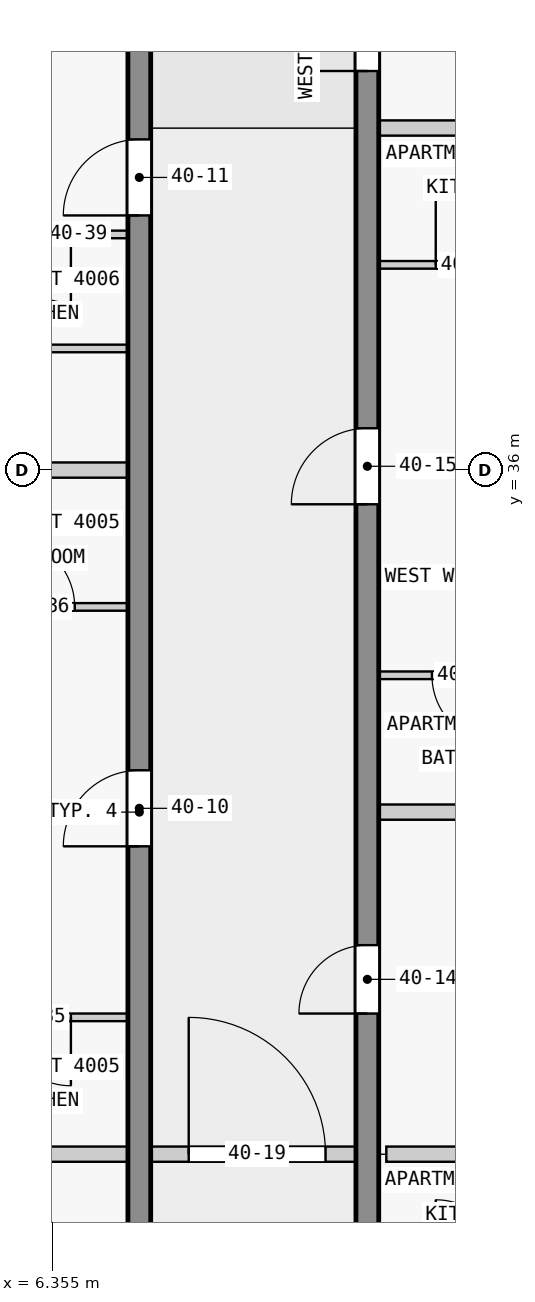
"""IFC4 building model, lengths in metres.
Left out: names, types, materials, properties, quantities, classifications, styles, units other than length and angle.
Written with IfcOpenShell. Run it as: python <this file> out.ifc"""

import sys

from ifc_helpers import new_model, si_unit, direction, frame, frame_2d, origin, place, context, subcontext, project, spatial, rectangle, extrude, element, fill, save


model = new_model("IFC4")
c1 = context("Model", 3, precision=1e-05, world=origin(), true_north=direction((0.0, 1.0)))
c2 = subcontext(c1, "Body", "Model", "MODEL_VIEW")
j1 = project(units=[si_unit("LENGTHUNIT", "METRE"), si_unit("PLANEANGLEUNIT", "RADIAN")], contexts=[c1])
p1 = place(None, origin())
s1 = spatial("IfcSite", under=j1, at=p1, CompositionType="ELEMENT")
p2 = place(p1, origin())
s2 = spatial("IfcBuilding", under=s1, at=p2, CompositionType="ELEMENT")
p3 = place(p2, frame((0.0, 0.0, 156.9)))
s3 = spatial("IfcBuildingStorey", under=s2, at=p3, CompositionType="ELEMENT", Elevation=156.9)
p4 = place(p3, frame((7.5, 18.0, 0.0), z_axis=(0.0, 0.0, 1.0), x_axis=(0.0, 1.0, 0.0)))
e1 = element("IfcWall", 1, at=p4, inside=s3, PredefinedType="SHEAR", context=c2, shape_type="SweptSolid", body=[
    extrude(rectangle(XDim=27.0, YDim=0.3, at=frame_2d((13.5, 0.0))), origin(), (0.0, 0.0, 1.0), 3.25),
])
p5 = place(p4, frame((1.75, 0.0, 0.0)))
e2 = element("IfcOpeningElement", 2, at=p5, cuts=e1, PredefinedType="OPENING", context=c2, shape_type="SweptSolid", body=[
    extrude(rectangle(XDim=1.0, YDim=2.1, at=frame_2d((0.5, 1.05))), frame((0.0, 0.16, 0.0), z_axis=(0.0, -1.0, 0.0), x_axis=(1.0, 0.0, 0.0)), (0.0, 0.0, 1.0), 0.32),
])
p6 = place(p4, frame((5.85, 0.0, 0.0)))
e3 = element("IfcOpeningElement", 3, at=p6, cuts=e1, PredefinedType="OPENING", context=c2, shape_type="SweptSolid", body=[
    extrude(rectangle(XDim=1.8, YDim=2.1, at=frame_2d((0.9, 1.05))), frame((0.0, 0.16, 0.0), z_axis=(0.0, -1.0, 0.0), x_axis=(1.0, 0.0, 0.0)), (0.0, 0.0, 1.0), 0.32),
])
p7 = place(p4, frame((13.05, 0.0, 0.0)))
e4 = element("IfcOpeningElement", 4, at=p7, cuts=e1, PredefinedType="OPENING", context=c2, shape_type="SweptSolid", body=[
    extrude(rectangle(XDim=1.0, YDim=2.1, at=frame_2d((0.5, 1.05))), frame((0.0, 0.16, 0.0), z_axis=(0.0, -1.0, 0.0), x_axis=(1.0, 0.0, 0.0)), (0.0, 0.0, 1.0), 0.32),
])
p8 = place(p4, frame((21.35, 0.0, 0.0)))
e5 = element("IfcOpeningElement", 5, at=p8, cuts=e1, PredefinedType="OPENING", context=c2, shape_type="SweptSolid", body=[
    extrude(rectangle(XDim=1.0, YDim=2.1, at=frame_2d((0.5, 1.05))), frame((0.0, 0.16, 0.0), z_axis=(0.0, -1.0, 0.0), x_axis=(1.0, 0.0, 0.0)), (0.0, 0.0, 1.0), 0.32),
])
p9 = place(p3, frame((10.5, 18.0, 0.0), z_axis=(0.0, 0.0, 1.0), x_axis=(0.0, 1.0, 0.0)))
e6 = element("IfcWall", 6, at=p9, inside=s3, PredefinedType="SHEAR", context=c2, shape_type="SweptSolid", body=[
    extrude(rectangle(XDim=27.0, YDim=0.3, at=frame_2d((13.5, 0.0))), origin(), (0.0, 0.0, 1.0), 3.25),
])
p10 = place(p9, frame((1.85, 0.0, 0.0)))
e7 = element("IfcOpeningElement", 7, at=p10, cuts=e6, PredefinedType="OPENING", context=c2, shape_type="SweptSolid", body=[
    extrude(rectangle(XDim=0.9, YDim=2.1, at=frame_2d((0.45, 1.05))), frame((0.0, 0.16, 0.0), z_axis=(0.0, -1.0, 0.0), x_axis=(1.0, 0.0, 0.0)), (0.0, 0.0, 1.0), 0.32),
])
p11 = place(p9, frame((6.25, 0.0, 0.0)))
e8 = element("IfcOpeningElement", 8, at=p11, cuts=e6, PredefinedType="OPENING", context=c2, shape_type="SweptSolid", body=[
    extrude(rectangle(XDim=1.0, YDim=2.1, at=frame_2d((0.5, 1.05))), frame((0.0, 0.16, 0.0), z_axis=(0.0, -1.0, 0.0), x_axis=(1.0, 0.0, 0.0)), (0.0, 0.0, 1.0), 0.32),
])
p12 = place(p9, frame((10.85, 0.0, 0.0)))
e9 = element("IfcOpeningElement", 9, at=p12, cuts=e6, PredefinedType="OPENING", context=c2, shape_type="SweptSolid", body=[
    extrude(rectangle(XDim=0.9, YDim=2.1, at=frame_2d((0.45, 1.05))), frame((0.0, 0.16, 0.0), z_axis=(0.0, -1.0, 0.0), x_axis=(1.0, 0.0, 0.0)), (0.0, 0.0, 1.0), 0.32),
])
p13 = place(p9, frame((17.55, 0.0, 0.0)))
e10 = element("IfcOpeningElement", 10, at=p13, cuts=e6, PredefinedType="OPENING", context=c2, shape_type="SweptSolid", body=[
    extrude(rectangle(XDim=1.0, YDim=2.1, at=frame_2d((0.5, 1.05))), frame((0.0, 0.16, 0.0), z_axis=(0.0, -1.0, 0.0), x_axis=(1.0, 0.0, 0.0)), (0.0, 0.0, 1.0), 0.32),
])
p14 = place(p9, frame((23.25, 0.0, 0.0)))
e11 = element("IfcOpeningElement", 11, at=p14, cuts=e6, PredefinedType="OPENING", context=c2, shape_type="SweptSolid", body=[
    extrude(rectangle(XDim=0.9, YDim=2.1, at=frame_2d((0.45, 1.05))), frame((0.0, 0.16, 0.0), z_axis=(0.0, -1.0, 0.0), x_axis=(1.0, 0.0, 0.0)), (0.0, 0.0, 1.0), 0.32),
])
p15 = place(p9, frame((25.45, 0.0, 0.0)))
e12 = element("IfcOpeningElement", 12, at=p15, cuts=e6, PredefinedType="OPENING", context=c2, shape_type="SweptSolid", body=[
    extrude(rectangle(XDim=1.0, YDim=2.1, at=frame_2d((0.5, 1.05))), frame((0.0, 0.16, 0.0), z_axis=(0.0, -1.0, 0.0), x_axis=(1.0, 0.0, 0.0)), (0.0, 0.0, 1.0), 0.32),
])
p16 = place(p3, frame((7.35, 27.0, 0.0), z_axis=(0.0, 0.0, 1.0), x_axis=(-1.0, 0.0, 0.0)))
e13 = element("IfcWall", 13, at=p16, inside=s3, PredefinedType="PARTITIONING", context=c2, shape_type="SweptSolid", body=[
    extrude(rectangle(XDim=7.43, YDim=0.2, at=frame_2d((3.715, 0.0))), origin(), (0.0, 0.0, 1.0), 3.25),
])
p17 = place(p3, frame((12.95, 27.0, 0.0), z_axis=(0.0, 0.0, 1.0), x_axis=(-1.0, 0.0, 0.0)))
e14 = element("IfcWall", 14, at=p17, inside=s3, PredefinedType="PARTITIONING", context=c2, shape_type="SweptSolid", body=[
    extrude(rectangle(XDim=2.2, YDim=0.2, at=frame_2d((1.1, 0.0))), origin(), (0.0, 0.0, 1.0), 3.25),
])
p18 = place(p3, frame((7.35, 28.8, 0.0), z_axis=(0.0, 0.0, 1.0), x_axis=(-1.0, 0.0, 0.0)))
e15 = element("IfcWall", 15, at=p18, inside=s3, PredefinedType="PARTITIONING", context=c2, shape_type="SweptSolid", body=[
    extrude(rectangle(XDim=2.4, YDim=0.1, at=frame_2d((1.2, 0.0))), origin(), (0.0, 0.0, 1.0), 3.25),
])
p19 = place(p18, frame((0.75, 0.0, 0.0)))
e16 = element("IfcOpeningElement", 16, at=p19, cuts=e15, PredefinedType="OPENING", context=c2, shape_type="SweptSolid", body=[
    extrude(rectangle(XDim=0.9, YDim=2.1, at=frame_2d((0.45, 1.05))), frame((0.0, 0.06, 0.0), z_axis=(0.0, -1.0, 0.0), x_axis=(1.0, 0.0, 0.0)), (0.0, 0.0, 1.0), 0.12),
])
p20 = place(p3, frame((17.85, 31.5, 0.0), z_axis=(0.0, 0.0, 1.0), x_axis=(-1.0, 0.0, 0.0)))
e17 = element("IfcWall", 17, at=p20, inside=s3, PredefinedType="PARTITIONING", context=c2, shape_type="SweptSolid", body=[
    extrude(rectangle(XDim=7.2, YDim=0.2, at=frame_2d((3.6, 0.0))), origin(), (0.0, 0.0, 1.0), 3.25),
])
p21 = place(p3, frame((13.0, 33.3, 0.0), z_axis=(0.0, 0.0, 1.0), x_axis=(-1.0, 0.0, 0.0)))
e18 = element("IfcWall", 18, at=p21, inside=s3, PredefinedType="PARTITIONING", context=c2, shape_type="SweptSolid", body=[
    extrude(rectangle(XDim=2.35, YDim=0.1, at=frame_2d((1.175, 0.0))), origin(), (0.0, 0.0, 1.0), 3.25),
])
p22 = place(p21, frame((0.75, 0.0, 0.0)))
e19 = element("IfcOpeningElement", 19, at=p22, cuts=e18, PredefinedType="OPENING", context=c2, shape_type="SweptSolid", body=[
    extrude(rectangle(XDim=0.9, YDim=2.1, at=frame_2d((0.45, 1.05))), frame((0.0, 0.06, 0.0), z_axis=(0.0, -1.0, 0.0), x_axis=(1.0, 0.0, 0.0)), (0.0, 0.0, 1.0), 0.12),
])
p23 = place(p3, frame((5.0, 34.2, 0.0), z_axis=(0.0, 0.0, 1.0), x_axis=(1.0, 0.0, 0.0)))
e20 = element("IfcWall", 20, at=p23, inside=s3, PredefinedType="PARTITIONING", context=c2, shape_type="SweptSolid", body=[
    extrude(rectangle(XDim=2.35, YDim=0.1, at=frame_2d((1.175, 0.0))), origin(), (0.0, 0.0, 1.0), 3.25),
])
p24 = place(p23, frame((0.75, 0.0, 0.0)))
e21 = element("IfcOpeningElement", 21, at=p24, cuts=e20, PredefinedType="OPENING", context=c2, shape_type="SweptSolid", body=[
    extrude(rectangle(XDim=0.9, YDim=2.1, at=frame_2d((0.45, 1.05))), frame((0.0, 0.06, 0.0), z_axis=(0.0, -1.0, 0.0), x_axis=(1.0, 0.0, 0.0)), (0.0, 0.0, 1.0), 0.12),
])
p25 = place(p3, frame((7.35, 36.0, 0.0), z_axis=(0.0, 0.0, 1.0), x_axis=(-1.0, 0.0, 0.0)))
e22 = element("IfcWall", 22, at=p25, inside=s3, PredefinedType="PARTITIONING", context=c2, shape_type="SweptSolid", body=[
    extrude(rectangle(XDim=5.95, YDim=0.2, at=frame_2d((2.975, 0.0))), origin(), (0.0, 0.0, 1.0), 3.25),
])
p26 = place(p3, frame((7.35, 37.6, 0.0), z_axis=(0.0, 0.0, 1.0), x_axis=(-1.0, 0.0, 0.0)))
e23 = element("IfcWall", 23, at=p26, inside=s3, PredefinedType="PARTITIONING", context=c2, shape_type="SweptSolid", body=[
    extrude(rectangle(XDim=2.35, YDim=0.1, at=frame_2d((1.175, 0.0))), origin(), (0.0, 0.0, 1.0), 3.25),
])
p27 = place(p3, frame((10.65, 38.7, 0.0), z_axis=(0.0, 0.0, 1.0), x_axis=(1.0, 0.0, 0.0)))
e24 = element("IfcWall", 24, at=p27, inside=s3, PredefinedType="PARTITIONING", context=c2, shape_type="SweptSolid", body=[
    extrude(rectangle(XDim=2.4, YDim=0.1, at=frame_2d((1.2, 0.0))), origin(), (0.0, 0.0, 1.0), 3.25),
])
p28 = place(p27, frame((0.75, 0.0, 0.0)))
e25 = element("IfcOpeningElement", 25, at=p28, cuts=e24, PredefinedType="OPENING", context=c2, shape_type="SweptSolid", body=[
    extrude(rectangle(XDim=0.9, YDim=2.1, at=frame_2d((0.45, 1.05))), frame((0.0, 0.06, 0.0), z_axis=(0.0, -1.0, 0.0), x_axis=(1.0, 0.0, 0.0)), (0.0, 0.0, 1.0), 0.12),
])
p29 = place(p3, frame((7.35, 39.1, 0.0), z_axis=(0.0, 0.0, 1.0), x_axis=(-1.0, 0.0, 0.0)))
e26 = element("IfcWall", 26, at=p29, inside=s3, PredefinedType="PARTITIONING", context=c2, shape_type="SweptSolid", body=[
    extrude(rectangle(XDim=2.35, YDim=0.1, at=frame_2d((1.175, 0.0))), origin(), (0.0, 0.0, 1.0), 3.25),
])
p30 = place(p29, frame((0.75, 0.0, 0.0)))
e27 = element("IfcOpeningElement", 27, at=p30, cuts=e26, PredefinedType="OPENING", context=c2, shape_type="SweptSolid", body=[
    extrude(rectangle(XDim=0.9, YDim=2.1, at=frame_2d((0.45, 1.05))), frame((0.0, 0.06, 0.0), z_axis=(0.0, -1.0, 0.0), x_axis=(1.0, 0.0, 0.0)), (0.0, 0.0, 1.0), 0.12),
])
p31 = place(p3, frame((12.95, 40.5, 0.0), z_axis=(0.0, 0.0, 1.0), x_axis=(-1.0, 0.0, 0.0)))
e28 = element("IfcWall", 28, at=p31, inside=s3, PredefinedType="PARTITIONING", context=c2, shape_type="SweptSolid", body=[
    extrude(rectangle(XDim=2.3, YDim=0.2, at=frame_2d((1.15, 0.0))), origin(), (0.0, 0.0, 1.0), 3.25),
])
p32 = place(p3, frame((7.45, 27.0, 0.0), z_axis=(0.0, 0.0, 1.0), x_axis=(1.0, 0.0, 0.0)))
e29 = element("IfcWall", 29, at=p32, inside=s3, PredefinedType="PARTITIONING", context=c2, shape_type="SweptSolid", body=[
    extrude(rectangle(XDim=3.2, YDim=0.2, at=frame_2d((1.6, 0.0))), origin(), (0.0, 0.0, 1.0), 3.25),
])
p33 = place(p32, frame((0.7, 0.0, 0.0)))
e30 = element("IfcOpeningElement", 30, at=p33, cuts=e29, PredefinedType="OPENING", context=c2, shape_type="SweptSolid", body=[
    extrude(rectangle(XDim=1.8, YDim=2.1, at=frame_2d((0.9, 1.05))), frame((0.0, 0.11, 0.0), z_axis=(0.0, -1.0, 0.0), x_axis=(1.0, 0.0, 0.0)), (0.0, 0.0, 1.0), 0.22),
])
p34 = place(p7, origin())
e31 = element("IfcDoor", 31, at=p34, inside=s3, OperationType="SINGLE_SWING_RIGHT", PredefinedType="DOOR", context=c2, shape_type="SweptSolid", body=[
    extrude(rectangle(XDim=1.0, YDim=2.1, at=frame_2d((0.5, 1.05))), frame((0.0, 0.025, 0.0), z_axis=(0.0, -1.0, 0.0), x_axis=(1.0, 0.0, 0.0)), (0.0, 0.0, 1.0), 0.05),
])
fill(e4, e31)
p35 = place(p8, origin())
e32 = element("IfcDoor", 32, at=p35, inside=s3, OperationType="SINGLE_SWING_RIGHT", PredefinedType="DOOR", context=c2, shape_type="SweptSolid", body=[
    extrude(rectangle(XDim=1.0, YDim=2.1, at=frame_2d((0.5, 1.05))), frame((0.0, 0.025, 0.0), z_axis=(0.0, -1.0, 0.0), x_axis=(1.0, 0.0, 0.0)), (0.0, 0.0, 1.0), 0.05),
])
fill(e5, e32)
p36 = place(p12, origin())
e33 = element("IfcDoor", 33, at=p36, inside=s3, OperationType="SINGLE_SWING_LEFT", PredefinedType="DOOR", context=c2, shape_type="SweptSolid", body=[
    extrude(rectangle(XDim=0.9, YDim=2.1, at=frame_2d((0.45, 1.05))), frame((0.0, 0.025, 0.0), z_axis=(0.0, -1.0, 0.0), x_axis=(1.0, 0.0, 0.0)), (0.0, 0.0, 1.0), 0.05),
])
fill(e9, e33)
p37 = place(p13, origin())
e34 = element("IfcDoor", 34, at=p37, inside=s3, OperationType="SINGLE_SWING_RIGHT", PredefinedType="DOOR", context=c2, shape_type="SweptSolid", body=[
    extrude(rectangle(XDim=1.0, YDim=2.1, at=frame_2d((0.5, 1.05))), frame((0.0, 0.025, 0.0), z_axis=(0.0, -1.0, 0.0), x_axis=(1.0, 0.0, 0.0)), (0.0, 0.0, 1.0), 0.05),
])
fill(e10, e34)
p38 = place(p14, origin())
e35 = element("IfcDoor", 35, at=p38, inside=s3, OperationType="SINGLE_SWING_RIGHT", PredefinedType="DOOR", context=c2, shape_type="SweptSolid", body=[
    extrude(rectangle(XDim=0.9, YDim=2.1, at=frame_2d((0.45, 1.05))), frame((0.0, 0.025, 0.0), z_axis=(0.0, -1.0, 0.0), x_axis=(1.0, 0.0, 0.0)), (0.0, 0.0, 1.0), 0.05),
])
fill(e11, e35)
p39 = place(p33, origin())
e36 = element("IfcDoor", 36, at=p39, inside=s3, OperationType="SINGLE_SWING_LEFT", PredefinedType="DOOR", context=c2, shape_type="SweptSolid", body=[
    extrude(rectangle(XDim=1.8, YDim=2.1, at=frame_2d((0.9, 1.05))), frame((0.0, 0.025, 0.0), z_axis=(0.0, -1.0, 0.0), x_axis=(1.0, 0.0, 0.0)), (0.0, 0.0, 1.0), 0.05),
])
fill(e30, e36)
p40 = place(p19, origin())
e37 = element("IfcDoor", 37, at=p40, inside=s3, OperationType="SINGLE_SWING_RIGHT", PredefinedType="DOOR", context=c2, shape_type="SweptSolid", body=[
    extrude(rectangle(XDim=0.9, YDim=2.1, at=frame_2d((0.45, 1.05))), frame((0.0, 0.025, 0.0), z_axis=(0.0, -1.0, 0.0), x_axis=(1.0, 0.0, 0.0)), (0.0, 0.0, 1.0), 0.05),
])
fill(e16, e37)
p41 = place(p24, origin())
e38 = element("IfcDoor", 38, at=p41, inside=s3, OperationType="SINGLE_SWING_RIGHT", PredefinedType="DOOR", context=c2, shape_type="SweptSolid", body=[
    extrude(rectangle(XDim=0.9, YDim=2.1, at=frame_2d((0.45, 1.05))), frame((0.0, 0.025, 0.0), z_axis=(0.0, -1.0, 0.0), x_axis=(1.0, 0.0, 0.0)), (0.0, 0.0, 1.0), 0.05),
])
fill(e21, e38)
p42 = place(p30, origin())
e39 = element("IfcDoor", 39, at=p42, inside=s3, OperationType="SINGLE_SWING_RIGHT", PredefinedType="DOOR", context=c2, shape_type="SweptSolid", body=[
    extrude(rectangle(XDim=0.9, YDim=2.1, at=frame_2d((0.45, 1.05))), frame((0.0, 0.025, 0.0), z_axis=(0.0, -1.0, 0.0), x_axis=(1.0, 0.0, 0.0)), (0.0, 0.0, 1.0), 0.05),
])
fill(e27, e39)
p43 = place(p22, origin())
e40 = element("IfcDoor", 40, at=p43, inside=s3, OperationType="SINGLE_SWING_RIGHT", PredefinedType="DOOR", context=c2, shape_type="SweptSolid", body=[
    extrude(rectangle(XDim=0.9, YDim=2.1, at=frame_2d((0.45, 1.05))), frame((0.0, 0.025, 0.0), z_axis=(0.0, -1.0, 0.0), x_axis=(1.0, 0.0, 0.0)), (0.0, 0.0, 1.0), 0.05),
])
fill(e19, e40)
p44 = place(p28, origin())
e41 = element("IfcDoor", 41, at=p44, inside=s3, OperationType="SINGLE_SWING_LEFT", PredefinedType="DOOR", context=c2, shape_type="SweptSolid", body=[
    extrude(rectangle(XDim=0.9, YDim=2.1, at=frame_2d((0.45, 1.05))), frame((0.0, 0.025, 0.0), z_axis=(0.0, -1.0, 0.0), x_axis=(1.0, 0.0, 0.0)), (0.0, 0.0, 1.0), 0.05),
])
fill(e25, e41)
save(model, sys.argv[1])
